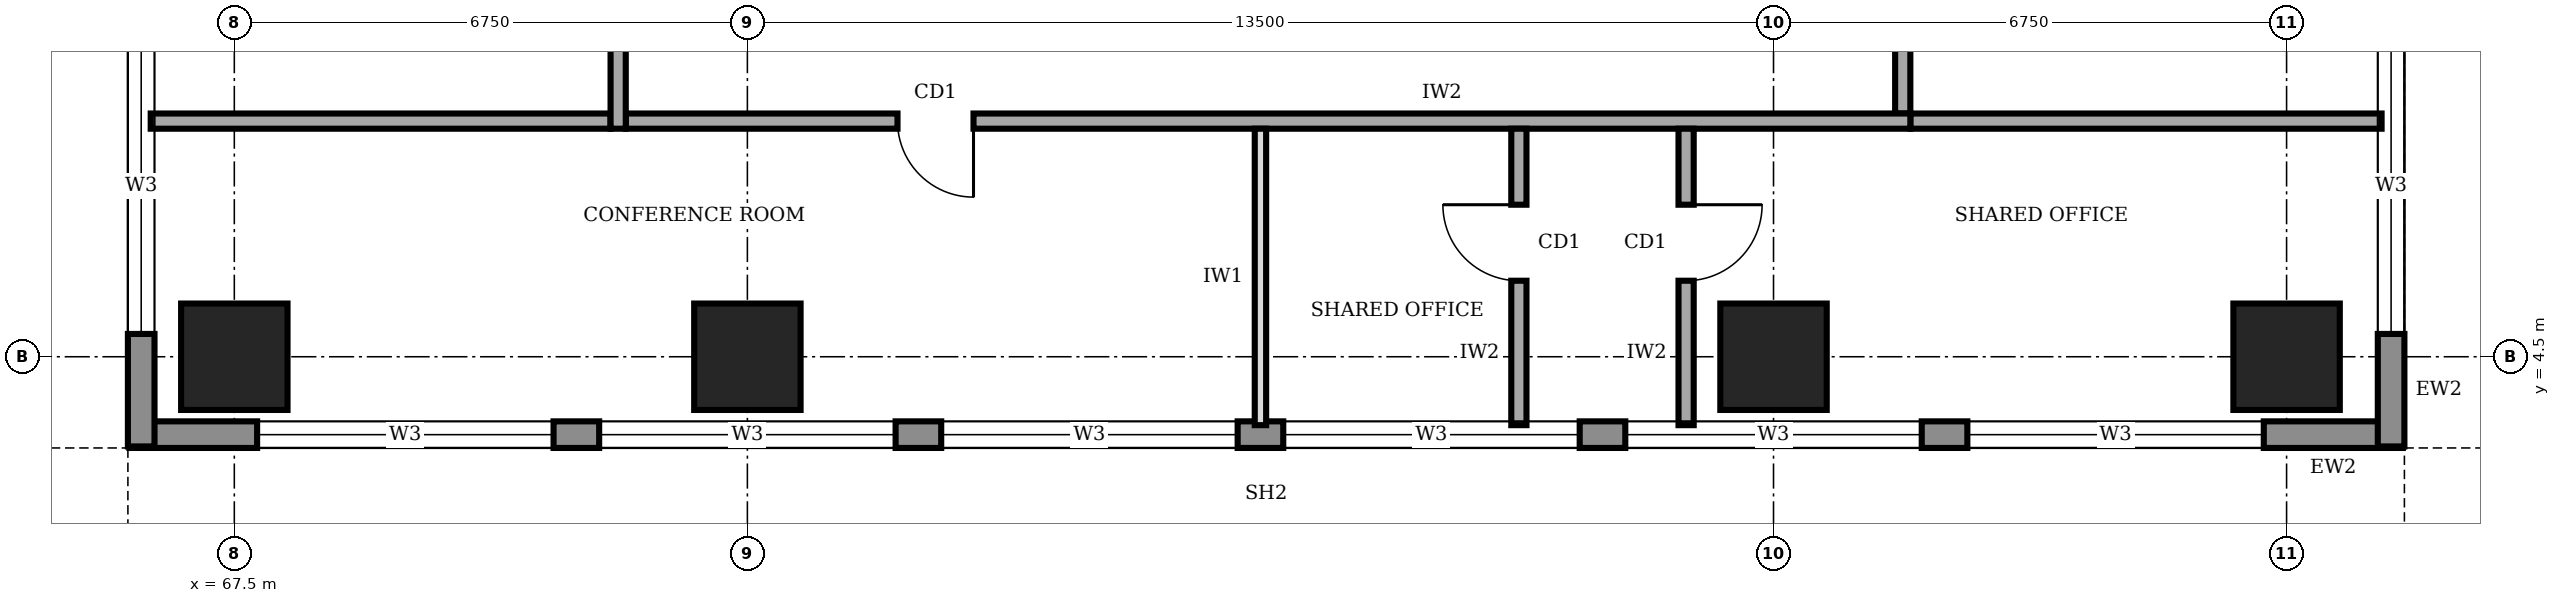
"""IFC4 building model, lengths in metres.
Left out: names, types, materials, properties, quantities, classifications, styles, units other than length and angle.
Written with IfcOpenShell. Run it as: python <this file> out.ifc"""

import sys

from ifc_helpers import new_model, si_unit, direction, frame, frame_2d, origin, origin_2d, place, context, subcontext, project, spatial, rectangle, extrude, element, fill, save


model = new_model("IFC4")
c1 = context("Model", 3, precision=1e-05, world=origin(), true_north=direction((0.0, 1.0)))
c2 = subcontext(c1, "Body", "Model", "MODEL_VIEW")
j1 = project(units=[si_unit("LENGTHUNIT", "METRE"), si_unit("PLANEANGLEUNIT", "RADIAN")], contexts=[c1])
p1 = place(None, origin())
s1 = spatial("IfcSite", under=j1, at=p1, CompositionType="ELEMENT")
p2 = place(p1, origin())
s2 = spatial("IfcBuilding", under=s1, at=p2, CompositionType="ELEMENT")
p3 = place(p2, frame((0.0, 0.0, 193.0)))
s3 = spatial("IfcBuildingStorey", under=s2, at=p3, CompositionType="ELEMENT", Elevation=193.0)
for number, where, z_axis, x_axis in (
    (1, (67.5, 4.5, 0.0), (0.0, 0.0, 1.0), (1.0, 0.0, 0.0)),
    (2, (74.25, 4.5, 0.0), (0.0, 0.0, 1.0), (1.0, 0.0, 0.0)),
    (3, (87.75, 4.5, 0.0), (0.0, 0.0, 1.0), (1.0, 0.0, 0.0)),
    (4, (94.5, 4.5, 0.0), (0.0, 0.0, 1.0), (1.0, 0.0, 0.0)),
):
    element("IfcColumn", number, at=place(p3, frame(where, z_axis=z_axis, x_axis=x_axis)), inside=s3, PredefinedType="COLUMN", context=c2, shape_type="SweptSolid", body=[
        extrude(rectangle(XDim=1.4, YDim=1.4, at=origin_2d()), origin(), (0.0, 0.0, 1.0), 4.0),
    ])
p4 = place(p3, frame((66.12, 3.475, 0.0), z_axis=(0.0, 0.0, 1.0), x_axis=(1.0, 0.0, 0.0)))
e5 = element("IfcWall", 5, at=p4, inside=s3, PredefinedType="STANDARD", context=c2, shape_type="SweptSolid", body=[
    extrude(rectangle(XDim=29.91, YDim=0.35, at=frame_2d((14.955, 0.0))), origin(), (0.0, 0.0, 1.0), 3.75),
])
p5 = place(p4, frame((1.68, 0.0, 0.95)))
e6 = element("IfcOpeningElement", 6, at=p5, cuts=e5, PredefinedType="OPENING", context=c2, shape_type="SweptSolid", body=[
    extrude(rectangle(XDim=3.9, YDim=1.8, at=frame_2d((1.95, 0.9))), frame((0.0, 0.185, 0.0), z_axis=(0.0, -1.0, 0.0), x_axis=(1.0, 0.0, 0.0)), (0.0, 0.0, 1.0), 0.37),
])
p6 = place(p4, frame((6.18, 0.0, 0.95)))
e7 = element("IfcOpeningElement", 7, at=p6, cuts=e5, PredefinedType="OPENING", context=c2, shape_type="SweptSolid", body=[
    extrude(rectangle(XDim=3.9, YDim=1.8, at=frame_2d((1.95, 0.9))), frame((0.0, 0.185, 0.0), z_axis=(0.0, -1.0, 0.0), x_axis=(1.0, 0.0, 0.0)), (0.0, 0.0, 1.0), 0.37),
])
p7 = place(p4, frame((10.68, 0.0, 0.95)))
e8 = element("IfcOpeningElement", 8, at=p7, cuts=e5, PredefinedType="OPENING", context=c2, shape_type="SweptSolid", body=[
    extrude(rectangle(XDim=3.9, YDim=1.8, at=frame_2d((1.95, 0.9))), frame((0.0, 0.185, 0.0), z_axis=(0.0, -1.0, 0.0), x_axis=(1.0, 0.0, 0.0)), (0.0, 0.0, 1.0), 0.37),
])
p8 = place(p4, frame((15.18, 0.0, 0.95)))
e9 = element("IfcOpeningElement", 9, at=p8, cuts=e5, PredefinedType="OPENING", context=c2, shape_type="SweptSolid", body=[
    extrude(rectangle(XDim=3.9, YDim=1.8, at=frame_2d((1.95, 0.9))), frame((0.0, 0.185, 0.0), z_axis=(0.0, -1.0, 0.0), x_axis=(1.0, 0.0, 0.0)), (0.0, 0.0, 1.0), 0.37),
])
p9 = place(p4, frame((19.68, 0.0, 0.95)))
e10 = element("IfcOpeningElement", 10, at=p9, cuts=e5, PredefinedType="OPENING", context=c2, shape_type="SweptSolid", body=[
    extrude(rectangle(XDim=3.9, YDim=1.8, at=frame_2d((1.95, 0.9))), frame((0.0, 0.185, 0.0), z_axis=(0.0, -1.0, 0.0), x_axis=(1.0, 0.0, 0.0)), (0.0, 0.0, 1.0), 0.37),
])
p10 = place(p4, frame((24.18, 0.0, 0.95)))
e11 = element("IfcOpeningElement", 11, at=p10, cuts=e5, PredefinedType="OPENING", context=c2, shape_type="SweptSolid", body=[
    extrude(rectangle(XDim=3.9, YDim=1.8, at=frame_2d((1.95, 0.9))), frame((0.0, 0.185, 0.0), z_axis=(0.0, -1.0, 0.0), x_axis=(1.0, 0.0, 0.0)), (0.0, 0.0, 1.0), 0.37),
])
p11 = place(p3, frame((95.875, 3.32, 0.0), z_axis=(0.0, 0.0, 1.0), x_axis=(0.0, 1.0, 0.0)))
e12 = element("IfcWall", 12, at=p11, inside=s3, PredefinedType="STANDARD", context=c2, shape_type="SweptSolid", body=[
    extrude(rectangle(XDim=33.86, YDim=0.35, at=frame_2d((16.93, 0.0))), origin(), (0.0, 0.0, 1.0), 3.75),
])
p12 = place(p11, frame((1.48, 0.0, 0.95)))
e13 = element("IfcOpeningElement", 13, at=p12, cuts=e12, PredefinedType="OPENING", context=c2, shape_type="SweptSolid", body=[
    extrude(rectangle(XDim=3.9, YDim=1.8, at=frame_2d((1.95, 0.9))), frame((0.0, 0.185, 0.0), z_axis=(0.0, -1.0, 0.0), x_axis=(1.0, 0.0, 0.0)), (0.0, 0.0, 1.0), 0.37),
])
p13 = place(p11, frame((5.98, 0.0, 0.95)))
e14 = element("IfcOpeningElement", 14, at=p13, cuts=e12, PredefinedType="OPENING", context=c2, shape_type="SweptSolid", body=[
    extrude(rectangle(XDim=3.9, YDim=1.8, at=frame_2d((1.95, 0.9))), frame((0.0, 0.185, 0.0), z_axis=(0.0, -1.0, 0.0), x_axis=(1.0, 0.0, 0.0)), (0.0, 0.0, 1.0), 0.37),
])
p14 = place(p11, frame((10.48, 0.0, 0.95)))
e15 = element("IfcOpeningElement", 15, at=p14, cuts=e12, PredefinedType="OPENING", context=c2, shape_type="SweptSolid", body=[
    extrude(rectangle(XDim=3.9, YDim=1.8, at=frame_2d((1.95, 0.9))), frame((0.0, 0.185, 0.0), z_axis=(0.0, -1.0, 0.0), x_axis=(1.0, 0.0, 0.0)), (0.0, 0.0, 1.0), 0.37),
])
p15 = place(p11, frame((14.98, 0.0, 0.95)))
e16 = element("IfcOpeningElement", 16, at=p15, cuts=e12, PredefinedType="OPENING", context=c2, shape_type="SweptSolid", body=[
    extrude(rectangle(XDim=3.9, YDim=1.8, at=frame_2d((1.95, 0.9))), frame((0.0, 0.185, 0.0), z_axis=(0.0, -1.0, 0.0), x_axis=(1.0, 0.0, 0.0)), (0.0, 0.0, 1.0), 0.37),
])
p16 = place(p11, frame((19.48, 0.0, 0.95)))
e17 = element("IfcOpeningElement", 17, at=p16, cuts=e12, PredefinedType="OPENING", context=c2, shape_type="SweptSolid", body=[
    extrude(rectangle(XDim=3.9, YDim=1.8, at=frame_2d((1.95, 0.9))), frame((0.0, 0.185, 0.0), z_axis=(0.0, -1.0, 0.0), x_axis=(1.0, 0.0, 0.0)), (0.0, 0.0, 1.0), 0.37),
])
p17 = place(p11, frame((23.98, 0.0, 0.95)))
e18 = element("IfcOpeningElement", 18, at=p17, cuts=e12, PredefinedType="OPENING", context=c2, shape_type="SweptSolid", body=[
    extrude(rectangle(XDim=3.9, YDim=1.8, at=frame_2d((1.95, 0.9))), frame((0.0, 0.185, 0.0), z_axis=(0.0, -1.0, 0.0), x_axis=(1.0, 0.0, 0.0)), (0.0, 0.0, 1.0), 0.37),
])
p18 = place(p11, frame((28.48, 0.0, 0.95)))
e19 = element("IfcOpeningElement", 19, at=p18, cuts=e12, PredefinedType="OPENING", context=c2, shape_type="SweptSolid", body=[
    extrude(rectangle(XDim=3.9, YDim=1.8, at=frame_2d((1.95, 0.9))), frame((0.0, 0.185, 0.0), z_axis=(0.0, -1.0, 0.0), x_axis=(1.0, 0.0, 0.0)), (0.0, 0.0, 1.0), 0.37),
])
p19 = place(p3, frame((66.275, 37.18, 0.0), z_axis=(0.0, 0.0, 1.0), x_axis=(0.0, -1.0, 0.0)))
e20 = element("IfcWall", 20, at=p19, inside=s3, PredefinedType="STANDARD", context=c2, shape_type="SweptSolid", body=[
    extrude(rectangle(XDim=33.86, YDim=0.35, at=frame_2d((16.93, 0.0))), origin(), (0.0, 0.0, 1.0), 3.75),
])
p20 = place(p19, frame((28.48, 0.0, 0.95)))
e21 = element("IfcOpeningElement", 21, at=p20, cuts=e20, PredefinedType="OPENING", context=c2, shape_type="SweptSolid", body=[
    extrude(rectangle(XDim=3.9, YDim=1.8, at=frame_2d((1.95, 0.9))), frame((0.0, 0.185, 0.0), z_axis=(0.0, -1.0, 0.0), x_axis=(1.0, 0.0, 0.0)), (0.0, 0.0, 1.0), 0.37),
])
p21 = place(p19, frame((23.98, 0.0, 0.95)))
e22 = element("IfcOpeningElement", 22, at=p21, cuts=e20, PredefinedType="OPENING", context=c2, shape_type="SweptSolid", body=[
    extrude(rectangle(XDim=3.9, YDim=1.8, at=frame_2d((1.95, 0.9))), frame((0.0, 0.185, 0.0), z_axis=(0.0, -1.0, 0.0), x_axis=(1.0, 0.0, 0.0)), (0.0, 0.0, 1.0), 0.37),
])
p22 = place(p19, frame((19.48, 0.0, 0.95)))
e23 = element("IfcOpeningElement", 23, at=p22, cuts=e20, PredefinedType="OPENING", context=c2, shape_type="SweptSolid", body=[
    extrude(rectangle(XDim=3.9, YDim=1.8, at=frame_2d((1.95, 0.9))), frame((0.0, 0.185, 0.0), z_axis=(0.0, -1.0, 0.0), x_axis=(1.0, 0.0, 0.0)), (0.0, 0.0, 1.0), 0.37),
])
p23 = place(p19, frame((14.98, 0.0, 0.95)))
e24 = element("IfcOpeningElement", 24, at=p23, cuts=e20, PredefinedType="OPENING", context=c2, shape_type="SweptSolid", body=[
    extrude(rectangle(XDim=3.9, YDim=1.8, at=frame_2d((1.95, 0.9))), frame((0.0, 0.185, 0.0), z_axis=(0.0, -1.0, 0.0), x_axis=(1.0, 0.0, 0.0)), (0.0, 0.0, 1.0), 0.37),
])
p24 = place(p19, frame((10.48, 0.0, 0.95)))
e25 = element("IfcOpeningElement", 25, at=p24, cuts=e20, PredefinedType="OPENING", context=c2, shape_type="SweptSolid", body=[
    extrude(rectangle(XDim=3.9, YDim=1.8, at=frame_2d((1.95, 0.9))), frame((0.0, 0.185, 0.0), z_axis=(0.0, -1.0, 0.0), x_axis=(1.0, 0.0, 0.0)), (0.0, 0.0, 1.0), 0.37),
])
p25 = place(p19, frame((5.98, 0.0, 0.95)))
e26 = element("IfcOpeningElement", 26, at=p25, cuts=e20, PredefinedType="OPENING", context=c2, shape_type="SweptSolid", body=[
    extrude(rectangle(XDim=3.9, YDim=1.8, at=frame_2d((1.95, 0.9))), frame((0.0, 0.185, 0.0), z_axis=(0.0, -1.0, 0.0), x_axis=(1.0, 0.0, 0.0)), (0.0, 0.0, 1.0), 0.37),
])
p26 = place(p19, frame((1.48, 0.0, 0.95)))
e27 = element("IfcOpeningElement", 27, at=p26, cuts=e20, PredefinedType="OPENING", context=c2, shape_type="SweptSolid", body=[
    extrude(rectangle(XDim=3.9, YDim=1.8, at=frame_2d((1.95, 0.9))), frame((0.0, 0.185, 0.0), z_axis=(0.0, -1.0, 0.0), x_axis=(1.0, 0.0, 0.0)), (0.0, 0.0, 1.0), 0.37),
])
p27 = place(p3, frame((72.65, 7.6, 0.0), z_axis=(0.0, 0.0, 1.0), x_axis=(1.0, 0.0, 0.0)))
e28 = element("IfcWall", 28, at=p27, inside=s3, PredefinedType="SOLIDWALL", context=c2, shape_type="SweptSolid", body=[
    extrude(rectangle(XDim=16.9, YDim=0.2, at=frame_2d((8.45, 0.0))), origin(), (0.0, 0.0, 1.0), 3.75),
])
p28 = place(p27, frame((3.575, 0.0, 0.0)))
e29 = element("IfcOpeningElement", 29, at=p28, cuts=e28, PredefinedType="OPENING", context=c2, shape_type="SweptSolid", body=[
    extrude(rectangle(XDim=1.0, YDim=2.1, at=frame_2d((0.5, 1.05))), frame((0.0, 0.11, 0.0), z_axis=(0.0, -1.0, 0.0), x_axis=(1.0, 0.0, 0.0)), (0.0, 0.0, 1.0), 0.22),
])
p29 = place(p3, frame((89.45, 7.7, 0.0), z_axis=(0.0, 0.0, 1.0), x_axis=(0.0, 1.0, 0.0)))
e30 = element("IfcWall", 30, at=p29, inside=s3, PredefinedType="SOLIDWALL", context=c2, shape_type="SweptSolid", body=[
    extrude(rectangle(XDim=25.3, YDim=0.2, at=frame_2d((12.65, 0.0))), origin(), (0.0, 0.0, 1.0), 3.75),
])
p30 = place(p29, frame((2.3, 0.0, 0.0)))
e31 = element("IfcOpeningElement", 31, at=p30, cuts=e30, PredefinedType="OPENING", context=c2, shape_type="SweptSolid", body=[
    extrude(rectangle(XDim=1.0, YDim=2.1, at=frame_2d((0.5, 1.05))), frame((0.0, 0.11, 0.0), z_axis=(0.0, -1.0, 0.0), x_axis=(1.0, 0.0, 0.0)), (0.0, 0.0, 1.0), 0.22),
])
p31 = place(p29, frame((7.25, 0.0, 0.0)))
e32 = element("IfcOpeningElement", 32, at=p31, cuts=e30, PredefinedType="OPENING", context=c2, shape_type="SweptSolid", body=[
    extrude(rectangle(XDim=0.9, YDim=2.1, at=frame_2d((0.45, 1.05))), frame((0.0, 0.11, 0.0), z_axis=(0.0, -1.0, 0.0), x_axis=(1.0, 0.0, 0.0)), (0.0, 0.0, 1.0), 0.22),
])
p32 = place(p29, frame((10.25, 0.0, 0.0)))
e33 = element("IfcOpeningElement", 33, at=p32, cuts=e30, PredefinedType="OPENING", context=c2, shape_type="SweptSolid", body=[
    extrude(rectangle(XDim=0.9, YDim=2.1, at=frame_2d((0.45, 1.05))), frame((0.0, 0.11, 0.0), z_axis=(0.0, -1.0, 0.0), x_axis=(1.0, 0.0, 0.0)), (0.0, 0.0, 1.0), 0.22),
])
p33 = place(p29, frame((15.1, 0.0, 0.0)))
e34 = element("IfcOpeningElement", 34, at=p33, cuts=e30, PredefinedType="OPENING", context=c2, shape_type="SweptSolid", body=[
    extrude(rectangle(XDim=0.9, YDim=2.1, at=frame_2d((0.45, 1.05))), frame((0.0, 0.11, 0.0), z_axis=(0.0, -1.0, 0.0), x_axis=(1.0, 0.0, 0.0)), (0.0, 0.0, 1.0), 0.22),
])
p34 = place(p29, frame((17.8, 0.0, 0.0)))
e35 = element("IfcOpeningElement", 35, at=p34, cuts=e30, PredefinedType="OPENING", context=c2, shape_type="SweptSolid", body=[
    extrude(rectangle(XDim=1.0, YDim=2.1, at=frame_2d((0.5, 1.05))), frame((0.0, 0.11, 0.0), z_axis=(0.0, -1.0, 0.0), x_axis=(1.0, 0.0, 0.0)), (0.0, 0.0, 1.0), 0.22),
])
p35 = place(p29, frame((12.3, 0.0, 0.0)))
e36 = element("IfcOpeningElement", 36, at=p35, cuts=e30, PredefinedType="OPENING", context=c2, shape_type="SweptSolid", body=[
    extrude(rectangle(XDim=1.0, YDim=2.1, at=frame_2d((0.5, 1.05))), frame((0.0, 0.11, 0.0), z_axis=(0.0, -1.0, 0.0), x_axis=(1.0, 0.0, 0.0)), (0.0, 0.0, 1.0), 0.22),
])
p36 = place(p29, frame((21.8, 0.0, 0.0)))
e37 = element("IfcOpeningElement", 37, at=p36, cuts=e30, PredefinedType="OPENING", context=c2, shape_type="SweptSolid", body=[
    extrude(rectangle(XDim=1.0, YDim=2.1, at=frame_2d((0.5, 1.05))), frame((0.0, 0.11, 0.0), z_axis=(0.0, -1.0, 0.0), x_axis=(1.0, 0.0, 0.0)), (0.0, 0.0, 1.0), 0.22),
])
p37 = place(p3, frame((72.55, 32.8, 0.0), z_axis=(0.0, 0.0, 1.0), x_axis=(0.0, -1.0, 0.0)))
e38 = element("IfcWall", 38, at=p37, inside=s3, PredefinedType="SOLIDWALL", context=c2, shape_type="SweptSolid", body=[
    extrude(rectangle(XDim=25.3, YDim=0.2, at=frame_2d((12.65, 0.0))), origin(), (0.0, 0.0, 1.0), 3.75),
])
p38 = place(p37, frame((19.55, 0.0, 0.0)))
e39 = element("IfcOpeningElement", 39, at=p38, cuts=e38, PredefinedType="OPENING", context=c2, shape_type="SweptSolid", body=[
    extrude(rectangle(XDim=1.0, YDim=2.1, at=frame_2d((0.5, 1.05))), frame((0.0, 0.11, 0.0), z_axis=(0.0, -1.0, 0.0), x_axis=(1.0, 0.0, 0.0)), (0.0, 0.0, 1.0), 0.22),
])
p39 = place(p37, frame((6.8, 0.0, 0.0)))
e40 = element("IfcOpeningElement", 40, at=p39, cuts=e38, PredefinedType="OPENING", context=c2, shape_type="SweptSolid", body=[
    extrude(rectangle(XDim=1.0, YDim=2.1, at=frame_2d((0.5, 1.05))), frame((0.0, 0.11, 0.0), z_axis=(0.0, -1.0, 0.0), x_axis=(1.0, 0.0, 0.0)), (0.0, 0.0, 1.0), 0.22),
])
p40 = place(p3, frame((84.4, 3.6, 0.0), z_axis=(0.0, 0.0, 1.0), x_axis=(0.0, 1.0, 0.0)))
e41 = element("IfcWall", 41, at=p40, inside=s3, PredefinedType="SOLIDWALL", context=c2, shape_type="SweptSolid", body=[
    extrude(rectangle(XDim=3.9, YDim=0.2, at=frame_2d((1.95, 0.0))), origin(), (0.0, 0.0, 1.0), 3.75),
])
p41 = place(p40, frame((1.9, 0.0, 0.0)))
e42 = element("IfcOpeningElement", 42, at=p41, cuts=e41, PredefinedType="OPENING", context=c2, shape_type="SweptSolid", body=[
    extrude(rectangle(XDim=1.0, YDim=2.1, at=frame_2d((0.5, 1.05))), frame((0.0, 0.11, 0.0), z_axis=(0.0, -1.0, 0.0), x_axis=(1.0, 0.0, 0.0)), (0.0, 0.0, 1.0), 0.22),
])
p42 = place(p3, frame((86.6, 7.5, 0.0), z_axis=(0.0, 0.0, 1.0), x_axis=(0.0, -1.0, 0.0)))
e43 = element("IfcWall", 43, at=p42, inside=s3, PredefinedType="SOLIDWALL", context=c2, shape_type="SweptSolid", body=[
    extrude(rectangle(XDim=3.9, YDim=0.2, at=frame_2d((1.95, 0.0))), origin(), (0.0, 0.0, 1.0), 3.75),
])
p43 = place(p42, frame((1.0, 0.0, 0.0)))
e44 = element("IfcOpeningElement", 44, at=p43, cuts=e43, PredefinedType="OPENING", context=c2, shape_type="SweptSolid", body=[
    extrude(rectangle(XDim=1.0, YDim=2.1, at=frame_2d((0.5, 1.05))), frame((0.0, 0.11, 0.0), z_axis=(0.0, -1.0, 0.0), x_axis=(1.0, 0.0, 0.0)), (0.0, 0.0, 1.0), 0.22),
])
p44 = place(p3, frame((66.4, 7.6, 0.0), z_axis=(0.0, 0.0, 1.0), x_axis=(1.0, 0.0, 0.0)))
e45 = element("IfcWall", 45, at=p44, inside=s3, PredefinedType="SOLIDWALL", context=c2, shape_type="SweptSolid", body=[
    extrude(rectangle(XDim=6.05, YDim=0.2, at=frame_2d((3.025, 0.0))), origin(), (0.0, 0.0, 1.0), 3.75),
])
p45 = place(p3, frame((89.55, 7.6, 0.0), z_axis=(0.0, 0.0, 1.0), x_axis=(1.0, 0.0, 0.0)))
e46 = element("IfcWall", 46, at=p45, inside=s3, PredefinedType="SOLIDWALL", context=c2, shape_type="SweptSolid", body=[
    extrude(rectangle(XDim=6.2, YDim=0.2, at=frame_2d((3.1, 0.0))), origin(), (0.0, 0.0, 1.0), 3.75),
])
p46 = place(p3, frame((81.0, 3.6, 0.0), z_axis=(0.0, 0.0, 1.0), x_axis=(0.0, 1.0, 0.0)))
e47 = element("IfcWall", 47, at=p46, inside=s3, PredefinedType="PARTITIONING", context=c2, shape_type="SweptSolid", body=[
    extrude(rectangle(XDim=3.9, YDim=0.15, at=frame_2d((1.95, 0.0))), origin(), (0.0, 0.0, 1.0), 3.75),
])
p47 = place(p5, origin())
e48 = element("IfcWindow", 48, at=p47, inside=s3, PartitioningType="SINGLE_PANEL", PredefinedType="WINDOW", context=c2, shape_type="SweptSolid", body=[
    extrude(rectangle(XDim=3.9, YDim=1.8, at=frame_2d((1.95, 0.9))), frame((0.0, 0.03, 0.0), z_axis=(0.0, -1.0, 0.0), x_axis=(1.0, 0.0, 0.0)), (0.0, 0.0, 1.0), 0.06),
])
fill(e6, e48)
p48 = place(p6, origin())
e49 = element("IfcWindow", 49, at=p48, inside=s3, PartitioningType="SINGLE_PANEL", PredefinedType="WINDOW", context=c2, shape_type="SweptSolid", body=[
    extrude(rectangle(XDim=3.9, YDim=1.8, at=frame_2d((1.95, 0.9))), frame((0.0, 0.03, 0.0), z_axis=(0.0, -1.0, 0.0), x_axis=(1.0, 0.0, 0.0)), (0.0, 0.0, 1.0), 0.06),
])
fill(e7, e49)
p49 = place(p7, origin())
e50 = element("IfcWindow", 50, at=p49, inside=s3, PartitioningType="SINGLE_PANEL", PredefinedType="WINDOW", context=c2, shape_type="SweptSolid", body=[
    extrude(rectangle(XDim=3.9, YDim=1.8, at=frame_2d((1.95, 0.9))), frame((0.0, 0.03, 0.0), z_axis=(0.0, -1.0, 0.0), x_axis=(1.0, 0.0, 0.0)), (0.0, 0.0, 1.0), 0.06),
])
fill(e8, e50)
p50 = place(p8, origin())
e51 = element("IfcWindow", 51, at=p50, inside=s3, PartitioningType="SINGLE_PANEL", PredefinedType="WINDOW", context=c2, shape_type="SweptSolid", body=[
    extrude(rectangle(XDim=3.9, YDim=1.8, at=frame_2d((1.95, 0.9))), frame((0.0, 0.03, 0.0), z_axis=(0.0, -1.0, 0.0), x_axis=(1.0, 0.0, 0.0)), (0.0, 0.0, 1.0), 0.06),
])
fill(e9, e51)
p51 = place(p9, origin())
e52 = element("IfcWindow", 52, at=p51, inside=s3, PartitioningType="SINGLE_PANEL", PredefinedType="WINDOW", context=c2, shape_type="SweptSolid", body=[
    extrude(rectangle(XDim=3.9, YDim=1.8, at=frame_2d((1.95, 0.9))), frame((0.0, 0.03, 0.0), z_axis=(0.0, -1.0, 0.0), x_axis=(1.0, 0.0, 0.0)), (0.0, 0.0, 1.0), 0.06),
])
fill(e10, e52)
p52 = place(p10, origin())
e53 = element("IfcWindow", 53, at=p52, inside=s3, PartitioningType="SINGLE_PANEL", PredefinedType="WINDOW", context=c2, shape_type="SweptSolid", body=[
    extrude(rectangle(XDim=3.9, YDim=1.8, at=frame_2d((1.95, 0.9))), frame((0.0, 0.03, 0.0), z_axis=(0.0, -1.0, 0.0), x_axis=(1.0, 0.0, 0.0)), (0.0, 0.0, 1.0), 0.06),
])
fill(e11, e53)
p53 = place(p12, origin())
e54 = element("IfcWindow", 54, at=p53, inside=s3, PartitioningType="SINGLE_PANEL", PredefinedType="WINDOW", context=c2, shape_type="SweptSolid", body=[
    extrude(rectangle(XDim=3.9, YDim=1.8, at=frame_2d((1.95, 0.9))), frame((0.0, 0.03, 0.0), z_axis=(0.0, -1.0, 0.0), x_axis=(1.0, 0.0, 0.0)), (0.0, 0.0, 1.0), 0.06),
])
fill(e13, e54)
p54 = place(p20, origin())
e55 = element("IfcWindow", 55, at=p54, inside=s3, PartitioningType="SINGLE_PANEL", PredefinedType="WINDOW", context=c2, shape_type="SweptSolid", body=[
    extrude(rectangle(XDim=3.9, YDim=1.8, at=frame_2d((1.95, 0.9))), frame((0.0, 0.03, 0.0), z_axis=(0.0, -1.0, 0.0), x_axis=(1.0, 0.0, 0.0)), (0.0, 0.0, 1.0), 0.06),
])
fill(e21, e55)
p55 = place(p28, frame((1.0, 0.0, 0.0), z_axis=(0.0, 0.0, 1.0), x_axis=(-1.0, 0.0, 0.0)))
e56 = element("IfcDoor", 56, at=p55, inside=s3, OperationType="SINGLE_SWING_LEFT", PredefinedType="DOOR", context=c2, shape_type="SweptSolid", body=[
    extrude(rectangle(XDim=1.0, YDim=2.1, at=frame_2d((0.5, 1.05))), frame((0.0, 0.025, 0.0), z_axis=(0.0, -1.0, 0.0), x_axis=(1.0, 0.0, 0.0)), (0.0, 0.0, 1.0), 0.05),
])
fill(e29, e56)
p56 = place(p41, origin())
e57 = element("IfcDoor", 57, at=p56, inside=s3, OperationType="SINGLE_SWING_RIGHT", PredefinedType="DOOR", context=c2, shape_type="SweptSolid", body=[
    extrude(rectangle(XDim=1.0, YDim=2.1, at=frame_2d((0.5, 1.05))), frame((0.0, 0.025, 0.0), z_axis=(0.0, -1.0, 0.0), x_axis=(1.0, 0.0, 0.0)), (0.0, 0.0, 1.0), 0.05),
])
fill(e42, e57)
p57 = place(p43, origin())
e58 = element("IfcDoor", 58, at=p57, inside=s3, OperationType="SINGLE_SWING_LEFT", PredefinedType="DOOR", context=c2, shape_type="SweptSolid", body=[
    extrude(rectangle(XDim=1.0, YDim=2.1, at=frame_2d((0.5, 1.05))), frame((0.0, 0.025, 0.0), z_axis=(0.0, -1.0, 0.0), x_axis=(1.0, 0.0, 0.0)), (0.0, 0.0, 1.0), 0.05),
])
fill(e44, e58)
save(model, sys.argv[1])
